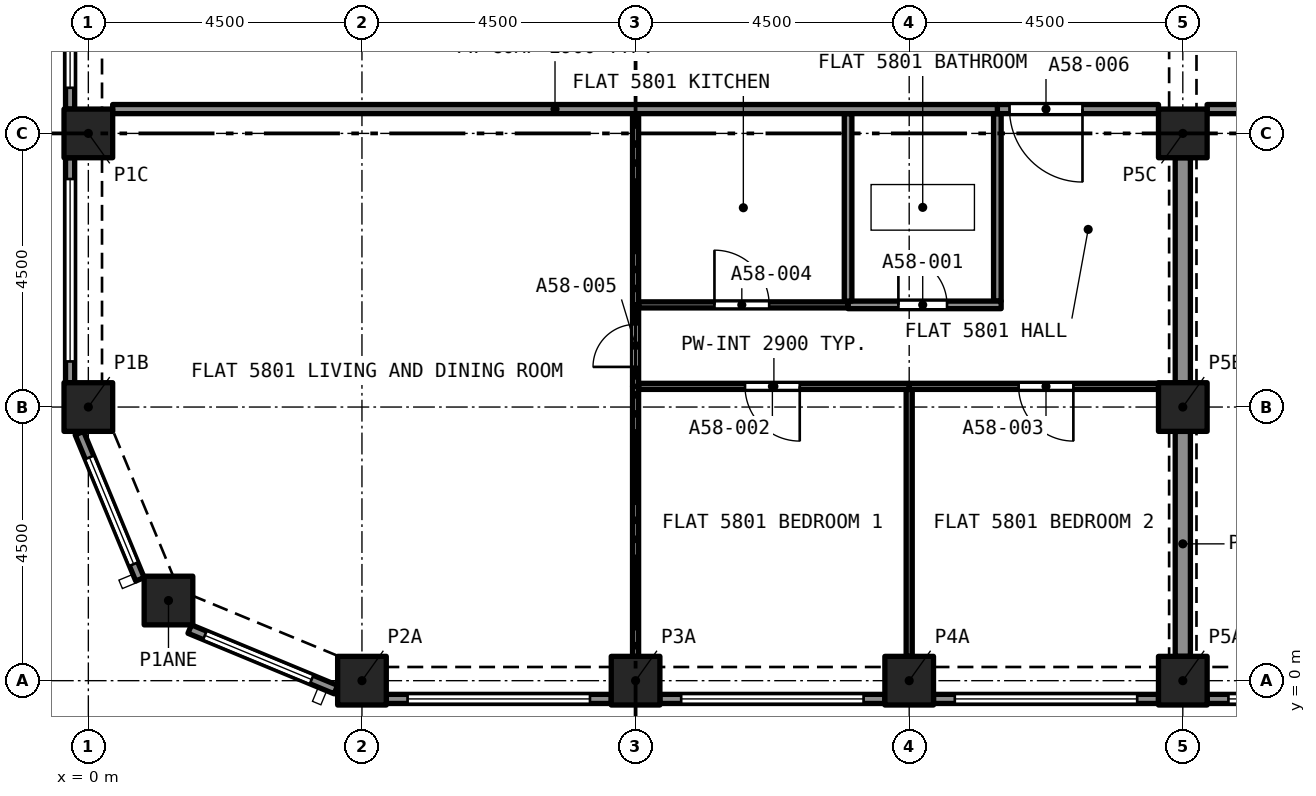
"""IFC4 building model, lengths in metres.
Left out: names, types, materials, properties, quantities, classifications, styles, units other than length and angle.
Written with IfcOpenShell. Run it as: python <this file> out.ifc"""

import sys

from ifc_helpers import new_model, si_unit, direction, frame, frame_2d, origin, origin_2d, place, context, subcontext, project, spatial, rectangle, extrude, element, fill, save


model = new_model("IFC4")
c1 = context("Model", 3, precision=1e-05, world=origin(), true_north=direction((0.0, 1.0)))
c2 = subcontext(c1, "Body", "Model", "MODEL_VIEW")
j1 = project(units=[si_unit("LENGTHUNIT", "METRE"), si_unit("PLANEANGLEUNIT", "RADIAN")], contexts=[c1])
p1 = place(None, origin())
s1 = spatial("IfcSite", under=j1, at=p1, CompositionType="ELEMENT")
p2 = place(p1, origin())
s2 = spatial("IfcBuilding", under=s1, at=p2, CompositionType="ELEMENT")
p3 = place(p2, frame((0.0, 0.0, 210.095)))
s3 = spatial("IfcBuildingStorey", under=s2, at=p3, CompositionType="ELEMENT", Elevation=210.095)
for number, where, z_axis, x_axis in (
    (1, (4.5, 0.0, 0.0), (0.0, 0.0, 1.0), (1.0, 0.0, 0.0)),
    (2, (9.0, 0.0, 0.0), (0.0, 0.0, 1.0), (1.0, 0.0, 0.0)),
    (3, (13.5, 0.0, 0.0), (0.0, 0.0, 1.0), (1.0, 0.0, 0.0)),
    (4, (18.0, 0.0, 0.0), (0.0, 0.0, 1.0), (1.0, 0.0, 0.0)),
    (5, (1.318, 1.318, 0.0), (0.0, 0.0, 1.0), (1.0, 0.0, 0.0)),
    (6, (0.0, 4.5, 0.0), (0.0, 0.0, 1.0), (1.0, 0.0, 0.0)),
    (7, (18.0, 4.5, 0.0), (0.0, 0.0, 1.0), (1.0, 0.0, 0.0)),
    (8, (0.0, 9.0, 0.0), (0.0, 0.0, 1.0), (1.0, 0.0, 0.0)),
    (9, (18.0, 9.0, 0.0), (0.0, 0.0, 1.0), (1.0, 0.0, 0.0)),
):
    element("IfcColumn", number, at=place(p3, frame(where, z_axis=z_axis, x_axis=x_axis)), inside=s3, PredefinedType="COLUMN", context=c2, shape_type="SweptSolid", body=[
        extrude(rectangle(XDim=0.8, YDim=0.8, at=origin_2d()), origin(), (0.0, 0.0, 1.0), 3.2),
    ])
p4 = place(p3, frame((-0.3, 9.4, 0.0), z_axis=(0.0, 0.0, 1.0), x_axis=(0.0, 1.0, 0.0)))
e10 = element("IfcWall", 10, at=p4, inside=s3, PredefinedType="SOLIDWALL", context=c2, shape_type="SweptSolid", body=[
    extrude(rectangle(XDim=3.7, YDim=0.15, at=frame_2d((1.85, 0.0))), origin(), (0.0, 0.0, 1.0), 3.2),
])
p5 = place(p4, frame((0.35, 0.0, 0.45)))
e11 = element("IfcOpeningElement", 11, at=p5, cuts=e10, PredefinedType="OPENING", context=c2, shape_type="SweptSolid", body=[
    extrude(rectangle(XDim=3.0, YDim=1.95, at=frame_2d((1.5, 0.975))), frame((0.0, 0.085, 0.0), z_axis=(0.0, -1.0, 0.0), x_axis=(1.0, 0.0, 0.0)), (0.0, 0.0, 1.0), 0.17),
])
p6 = place(p3, frame((-0.3, 4.9, 0.0), z_axis=(0.0, 0.0, 1.0), x_axis=(0.0, 1.0, 0.0)))
e12 = element("IfcWall", 12, at=p6, inside=s3, PredefinedType="SOLIDWALL", context=c2, shape_type="SweptSolid", body=[
    extrude(rectangle(XDim=3.7, YDim=0.15, at=frame_2d((1.85, 0.0))), origin(), (0.0, 0.0, 1.0), 3.2),
])
p7 = place(p6, frame((0.35, 0.0, 0.45)))
e13 = element("IfcOpeningElement", 13, at=p7, cuts=e12, PredefinedType="OPENING", context=c2, shape_type="SweptSolid", body=[
    extrude(rectangle(XDim=3.0, YDim=1.95, at=frame_2d((1.5, 0.975))), frame((0.0, 0.085, 0.0), z_axis=(0.0, -1.0, 0.0), x_axis=(1.0, 0.0, 0.0)), (0.0, 0.0, 1.0), 0.17),
])
p8 = place(p3, frame((0.849, 1.667, 0.0), z_axis=(0.0, 0.0, 1.0), x_axis=(-0.382669406082, 0.923885342263, 0.0)))
e14 = element("IfcWall", 14, at=p8, inside=s3, PredefinedType="SOLIDWALL", context=c2, shape_type="SweptSolid", body=[
    extrude(rectangle(XDim=2.602, YDim=0.15, at=frame_2d((1.301, 0.0))), origin(), (0.0, 0.0, 1.0), 3.2),
])
p9 = place(p8, frame((0.27, 0.0, 0.45)))
e15 = element("IfcOpeningElement", 15, at=p9, cuts=e14, PredefinedType="OPENING", context=c2, shape_type="SweptSolid", body=[
    extrude(rectangle(XDim=1.9, YDim=1.95, at=frame_2d((0.95, 0.975))), frame((0.0, 0.085, 0.0), z_axis=(0.0, -1.0, 0.0), x_axis=(1.0, 0.0, 0.0)), (0.0, 0.0, 1.0), 0.17),
])
p10 = place(p3, frame((4.071, -0.147, 0.0), z_axis=(0.0, 0.0, 1.0), x_axis=(-0.923885342263, 0.382669406082, 0.0)))
e16 = element("IfcWall", 16, at=p10, inside=s3, PredefinedType="SOLIDWALL", context=c2, shape_type="SweptSolid", body=[
    extrude(rectangle(XDim=2.602, YDim=0.15, at=frame_2d((1.301, 0.0))), origin(), (0.0, 0.0, 1.0), 3.2),
])
p11 = place(p10, frame((0.432, 0.0, 0.45)))
e17 = element("IfcOpeningElement", 17, at=p11, cuts=e16, PredefinedType="OPENING", context=c2, shape_type="SweptSolid", body=[
    extrude(rectangle(XDim=1.9, YDim=1.95, at=frame_2d((0.95, 0.975))), frame((0.0, 0.085, 0.0), z_axis=(0.0, -1.0, 0.0), x_axis=(1.0, 0.0, 0.0)), (0.0, 0.0, 1.0), 0.17),
])
p12 = place(p3, frame((8.6, -0.3, 0.0), z_axis=(0.0, 0.0, 1.0), x_axis=(-1.0, 0.0, 0.0)))
e18 = element("IfcWall", 18, at=p12, inside=s3, PredefinedType="SOLIDWALL", context=c2, shape_type="SweptSolid", body=[
    extrude(rectangle(XDim=3.7, YDim=0.15, at=frame_2d((1.85, 0.0))), origin(), (0.0, 0.0, 1.0), 3.2),
])
p13 = place(p12, frame((0.35, 0.0, 0.45)))
e19 = element("IfcOpeningElement", 19, at=p13, cuts=e18, PredefinedType="OPENING", context=c2, shape_type="SweptSolid", body=[
    extrude(rectangle(XDim=3.0, YDim=1.95, at=frame_2d((1.5, 0.975))), frame((0.0, 0.085, 0.0), z_axis=(0.0, -1.0, 0.0), x_axis=(1.0, 0.0, 0.0)), (0.0, 0.0, 1.0), 0.17),
])
p14 = place(p3, frame((13.1, -0.3, 0.0), z_axis=(0.0, 0.0, 1.0), x_axis=(-1.0, 0.0, 0.0)))
e20 = element("IfcWall", 20, at=p14, inside=s3, PredefinedType="SOLIDWALL", context=c2, shape_type="SweptSolid", body=[
    extrude(rectangle(XDim=3.7, YDim=0.15, at=frame_2d((1.85, 0.0))), origin(), (0.0, 0.0, 1.0), 3.2),
])
p15 = place(p14, frame((0.35, 0.0, 0.45)))
e21 = element("IfcOpeningElement", 21, at=p15, cuts=e20, PredefinedType="OPENING", context=c2, shape_type="SweptSolid", body=[
    extrude(rectangle(XDim=3.0, YDim=1.95, at=frame_2d((1.5, 0.975))), frame((0.0, 0.085, 0.0), z_axis=(0.0, -1.0, 0.0), x_axis=(1.0, 0.0, 0.0)), (0.0, 0.0, 1.0), 0.17),
])
p16 = place(p3, frame((17.6, -0.3, 0.0), z_axis=(0.0, 0.0, 1.0), x_axis=(-1.0, 0.0, 0.0)))
e22 = element("IfcWall", 22, at=p16, inside=s3, PredefinedType="SOLIDWALL", context=c2, shape_type="SweptSolid", body=[
    extrude(rectangle(XDim=3.7, YDim=0.15, at=frame_2d((1.85, 0.0))), origin(), (0.0, 0.0, 1.0), 3.2),
])
p17 = place(p16, frame((0.35, 0.0, 0.45)))
e23 = element("IfcOpeningElement", 23, at=p17, cuts=e22, PredefinedType="OPENING", context=c2, shape_type="SweptSolid", body=[
    extrude(rectangle(XDim=3.0, YDim=1.95, at=frame_2d((1.5, 0.975))), frame((0.0, 0.085, 0.0), z_axis=(0.0, -1.0, 0.0), x_axis=(1.0, 0.0, 0.0)), (0.0, 0.0, 1.0), 0.17),
])
p18 = place(p3, frame((22.1, -0.3, 0.0), z_axis=(0.0, 0.0, 1.0), x_axis=(-1.0, 0.0, 0.0)))
e24 = element("IfcWall", 24, at=p18, inside=s3, PredefinedType="SOLIDWALL", context=c2, shape_type="SweptSolid", body=[
    extrude(rectangle(XDim=3.7, YDim=0.15, at=frame_2d((1.85, 0.0))), origin(), (0.0, 0.0, 1.0), 3.2),
])
p19 = place(p18, frame((0.35, 0.0, 0.45)))
e25 = element("IfcOpeningElement", 25, at=p19, cuts=e24, PredefinedType="OPENING", context=c2, shape_type="SweptSolid", body=[
    extrude(rectangle(XDim=3.0, YDim=1.95, at=frame_2d((1.5, 0.975))), frame((0.0, 0.085, 0.0), z_axis=(0.0, -1.0, 0.0), x_axis=(1.0, 0.0, 0.0)), (0.0, 0.0, 1.0), 0.17),
])
p20 = place(p3, frame((14.95, 6.242, 0.0), z_axis=(0.0, 0.0, 1.0), x_axis=(0.0, 1.0, 0.0)))
e26 = element("IfcWall", 26, at=p20, inside=s3, PredefinedType="PARTITIONING", context=c2, shape_type="SweptSolid", body=[
    extrude(rectangle(XDim=3.083, YDim=0.125, at=frame_2d((1.541, 0.0))), origin(), (0.0, 0.0, 1.0), 2.9),
])
p21 = place(p3, frame((12.495, 6.18, 0.0), z_axis=(0.0, 0.0, 1.0), x_axis=(1.0, 0.0, 0.0)))
e27 = element("IfcWall", 27, at=p21, inside=s3, PredefinedType="PARTITIONING", context=c2, shape_type="SweptSolid", body=[
    extrude(rectangle(XDim=2.518, YDim=0.125, at=frame_2d((1.259, 0.0))), origin(), (0.0, 0.0, 1.0), 2.9),
])
p22 = place(p21, frame((0.828, 0.0, 0.0)))
e28 = element("IfcOpeningElement", 28, at=p22, cuts=e27, PredefinedType="OPENING", context=c2, shape_type="SweptSolid", body=[
    extrude(rectangle(XDim=0.8, YDim=2.1, at=frame_2d((0.4, 1.05))), frame((0.0, 0.073, 0.0), z_axis=(0.0, -1.0, 0.0), x_axis=(1.0, 0.0, 0.0)), (0.0, 0.0, 1.0), 0.145),
])
p23 = place(p3, frame((12.495, 6.242, 0.0), z_axis=(0.0, 0.0, 1.0), x_axis=(0.0, 1.0, 0.0)))
e29 = element("IfcWall", 29, at=p23, inside=s3, PredefinedType="PARTITIONING", context=c2, shape_type="SweptSolid", body=[
    extrude(rectangle(XDim=3.083, YDim=0.125, at=frame_2d((1.541, 0.0))), origin(), (0.0, 0.0, 1.0), 2.9),
])
p24 = place(p3, frame((13.5, 0.4, 0.0), z_axis=(0.0, 0.0, 1.0), x_axis=(0.0, 1.0, 0.0)))
e30 = element("IfcWall", 30, at=p24, inside=s3, PredefinedType="PARTITIONING", context=c2, shape_type="SweptSolid", body=[
    extrude(rectangle(XDim=4.39, YDim=0.1, at=frame_2d((2.195, 0.0))), origin(), (0.0, 0.0, 1.0), 2.9),
])
p25 = place(p3, frame((13.5, 4.84, 0.0), z_axis=(0.0, 0.0, 1.0), x_axis=(-1.0, 0.0, 0.0)))
e31 = element("IfcWall", 31, at=p25, inside=s3, PredefinedType="PARTITIONING", context=c2, shape_type="SweptSolid", body=[
    extrude(rectangle(XDim=4.45, YDim=0.1, at=frame_2d((2.225, 0.0))), origin(), (0.0, 0.0, 1.0), 2.9),
])
p26 = place(p25, frame((1.8, 0.0, 0.0)))
e32 = element("IfcOpeningElement", 32, at=p26, cuts=e31, PredefinedType="OPENING", context=c2, shape_type="SweptSolid", body=[
    extrude(rectangle(XDim=0.9, YDim=2.1, at=frame_2d((0.45, 1.05))), frame((0.0, 0.06, 0.0), z_axis=(0.0, -1.0, 0.0), x_axis=(1.0, 0.0, 0.0)), (0.0, 0.0, 1.0), 0.12),
])
p27 = place(p3, frame((9.0, 0.4, 0.0), z_axis=(0.0, 0.0, 1.0), x_axis=(0.0, 1.0, 0.0)))
e33 = element("IfcWall", 33, at=p27, inside=s3, PredefinedType="PARTITIONING", context=c2, shape_type="SweptSolid", body=[
    extrude(rectangle(XDim=4.44, YDim=0.1, at=frame_2d((2.22, 0.0))), origin(), (0.0, 0.0, 1.0), 2.9),
])
p28 = place(p3, frame((17.6, 4.84, 0.0), z_axis=(0.0, 0.0, 1.0), x_axis=(-1.0, 0.0, 0.0)))
e34 = element("IfcWall", 34, at=p28, inside=s3, PredefinedType="PARTITIONING", context=c2, shape_type="SweptSolid", body=[
    extrude(rectangle(XDim=4.1, YDim=0.1, at=frame_2d((2.05, 0.0))), origin(), (0.0, 0.0, 1.0), 2.9),
])
p29 = place(p28, frame((1.4, 0.0, 0.0)))
e35 = element("IfcOpeningElement", 35, at=p29, cuts=e34, PredefinedType="OPENING", context=c2, shape_type="SweptSolid", body=[
    extrude(rectangle(XDim=0.9, YDim=2.1, at=frame_2d((0.45, 1.05))), frame((0.0, 0.06, 0.0), z_axis=(0.0, -1.0, 0.0), x_axis=(1.0, 0.0, 0.0)), (0.0, 0.0, 1.0), 0.12),
])
p30 = place(p3, frame((18.0, 0.4, 0.0), z_axis=(0.0, 0.0, 1.0), x_axis=(0.0, 1.0, 0.0)))
e36 = element("IfcWall", 36, at=p30, inside=s3, PredefinedType="PARTITIONING", context=c2, shape_type="SweptSolid", body=[
    extrude(rectangle(XDim=3.7, YDim=0.25, at=frame_2d((1.85, 0.0))), origin(), (0.0, 0.0, 1.0), 2.38),
])
p31 = place(p3, frame((9.05, 6.18, 0.0), z_axis=(0.0, 0.0, 1.0), x_axis=(1.0, 0.0, 0.0)))
e37 = element("IfcWall", 37, at=p31, inside=s3, PredefinedType="PARTITIONING", context=c2, shape_type="SweptSolid", body=[
    extrude(rectangle(XDim=3.445, YDim=0.1, at=frame_2d((1.722, 0.0))), origin(), (0.0, 0.0, 1.0), 2.9),
])
p32 = place(p31, frame((1.247, 0.0, 0.0)))
e38 = element("IfcOpeningElement", 38, at=p32, cuts=e37, PredefinedType="OPENING", context=c2, shape_type="SweptSolid", body=[
    extrude(rectangle(XDim=0.9, YDim=2.1, at=frame_2d((0.45, 1.05))), frame((0.0, 0.06, 0.0), z_axis=(0.0, -1.0, 0.0), x_axis=(1.0, 0.0, 0.0)), (0.0, 0.0, 1.0), 0.12),
])
p33 = place(p3, frame((9.0, 4.84, 0.0), z_axis=(0.0, 0.0, 1.0), x_axis=(0.0, 1.0, 0.0)))
e39 = element("IfcWall", 39, at=p33, inside=s3, PredefinedType="PARTITIONING", context=c2, shape_type="SweptSolid", body=[
    extrude(rectangle(XDim=1.34, YDim=0.1, at=frame_2d((0.67, 0.0))), origin(), (0.0, 0.0, 1.0), 2.9),
])
p34 = place(p33, frame((0.32, 0.0, 0.0)))
e40 = element("IfcOpeningElement", 40, at=p34, cuts=e39, PredefinedType="OPENING", context=c2, shape_type="SweptSolid", body=[
    extrude(rectangle(XDim=0.7, YDim=2.1, at=frame_2d((0.35, 1.05))), frame((0.0, 0.06, 0.0), z_axis=(0.0, -1.0, 0.0), x_axis=(1.0, 0.0, 0.0)), (0.0, 0.0, 1.0), 0.12),
])
p35 = place(p3, frame((18.0, 4.9, 0.0), z_axis=(0.0, 0.0, 1.0), x_axis=(0.0, 1.0, 0.0)))
e41 = element("IfcWall", 41, at=p35, inside=s3, PredefinedType="PARTITIONING", context=c2, shape_type="SweptSolid", body=[
    extrude(rectangle(XDim=3.7, YDim=0.25, at=frame_2d((1.85, 0.0))), origin(), (0.0, 0.0, 1.0), 2.38),
])
p36 = place(p3, frame((17.6, 9.4, 0.0), z_axis=(0.0, 0.0, 1.0), x_axis=(-1.0, 0.0, 0.0)))
e42 = element("IfcWall", 42, at=p36, inside=s3, PredefinedType="PARTITIONING", context=c2, shape_type="SweptSolid", body=[
    extrude(rectangle(XDim=2.65, YDim=0.15, at=frame_2d((1.325, 0.0))), origin(), (0.0, 0.0, 1.0), 2.9),
])
p37 = place(p36, frame((1.25, 0.0, 0.0)))
e43 = element("IfcOpeningElement", 43, at=p37, cuts=e42, PredefinedType="OPENING", context=c2, shape_type="SweptSolid", body=[
    extrude(rectangle(XDim=1.2, YDim=2.4, at=frame_2d((0.6, 1.2))), frame((0.0, 0.085, 0.0), z_axis=(0.0, -1.0, 0.0), x_axis=(1.0, 0.0, 0.0)), (0.0, 0.0, 1.0), 0.17),
])
p38 = place(p3, frame((9.0, 6.18, 0.0), z_axis=(0.0, 0.0, 1.0), x_axis=(0.0, 1.0, 0.0)))
e44 = element("IfcWall", 44, at=p38, inside=s3, PredefinedType="PARTITIONING", context=c2, shape_type="SweptSolid", body=[
    extrude(rectangle(XDim=3.145, YDim=0.1, at=frame_2d((1.573, 0.0))), origin(), (0.0, 0.0, 1.0), 2.9),
])
p39 = place(p3, frame((0.4, 9.4, 0.0), z_axis=(0.0, 0.0, 1.0), x_axis=(1.0, 0.0, 0.0)))
e45 = element("IfcWall", 45, at=p39, inside=s3, PredefinedType="PARTITIONING", context=c2, shape_type="SweptSolid", body=[
    extrude(rectangle(XDim=14.55, YDim=0.15, at=frame_2d((7.275, 0.0))), origin(), (0.0, 0.0, 1.0), 2.9),
])
p40 = place(p3, frame((27.0, 9.4, 0.0), z_axis=(0.0, 0.0, 1.0), x_axis=(-1.0, 0.0, 0.0)))
e46 = element("IfcWall", 46, at=p40, inside=s3, PredefinedType="PARTITIONING", context=c2, shape_type="SweptSolid", body=[
    extrude(rectangle(XDim=8.6, YDim=0.15, at=frame_2d((4.3, 0.0))), origin(), (0.0, 0.0, 1.0), 2.75),
])
p41 = place(p40, frame((4.0, 0.0, 0.0)))
e47 = element("IfcOpeningElement", 47, at=p41, cuts=e46, PredefinedType="OPENING", context=c2, shape_type="SweptSolid", body=[
    extrude(rectangle(XDim=1.0, YDim=2.1, at=frame_2d((0.5, 1.05))), frame((0.0, 0.085, 0.0), z_axis=(0.0, -1.0, 0.0), x_axis=(1.0, 0.0, 0.0)), (0.0, 0.0, 1.0), 0.17),
])
p42 = place(p5, origin())
e48 = element("IfcWindow", 48, at=p42, inside=s3, PartitioningType="SINGLE_PANEL", PredefinedType="WINDOW", context=c2, shape_type="SweptSolid", body=[
    extrude(rectangle(XDim=3.0, YDim=1.95, at=frame_2d((1.5, 0.975))), frame((0.0, 0.03, 0.0), z_axis=(0.0, -1.0, 0.0), x_axis=(1.0, 0.0, 0.0)), (0.0, 0.0, 1.0), 0.06),
])
fill(e11, e48)
p43 = place(p7, origin())
e49 = element("IfcWindow", 49, at=p43, inside=s3, PartitioningType="SINGLE_PANEL", PredefinedType="WINDOW", context=c2, shape_type="SweptSolid", body=[
    extrude(rectangle(XDim=3.0, YDim=1.95, at=frame_2d((1.5, 0.975))), frame((0.0, 0.03, 0.0), z_axis=(0.0, -1.0, 0.0), x_axis=(1.0, 0.0, 0.0)), (0.0, 0.0, 1.0), 0.06),
])
fill(e13, e49)
p44 = place(p9, origin())
e50 = element("IfcWindow", 50, at=p44, inside=s3, PartitioningType="SINGLE_PANEL", PredefinedType="WINDOW", context=c2, shape_type="SweptSolid", body=[
    extrude(rectangle(XDim=1.9, YDim=1.95, at=frame_2d((0.95, 0.975))), frame((0.0, 0.03, 0.0), z_axis=(0.0, -1.0, 0.0), x_axis=(1.0, 0.0, 0.0)), (0.0, 0.0, 1.0), 0.06),
])
fill(e15, e50)
p45 = place(p11, origin())
e51 = element("IfcWindow", 51, at=p45, inside=s3, PartitioningType="SINGLE_PANEL", PredefinedType="WINDOW", context=c2, shape_type="SweptSolid", body=[
    extrude(rectangle(XDim=1.9, YDim=1.95, at=frame_2d((0.95, 0.975))), frame((0.0, 0.03, 0.0), z_axis=(0.0, -1.0, 0.0), x_axis=(1.0, 0.0, 0.0)), (0.0, 0.0, 1.0), 0.06),
])
fill(e17, e51)
p46 = place(p13, origin())
e52 = element("IfcWindow", 52, at=p46, inside=s3, PartitioningType="SINGLE_PANEL", PredefinedType="WINDOW", context=c2, shape_type="SweptSolid", body=[
    extrude(rectangle(XDim=3.0, YDim=1.95, at=frame_2d((1.5, 0.975))), frame((0.0, 0.03, 0.0), z_axis=(0.0, -1.0, 0.0), x_axis=(1.0, 0.0, 0.0)), (0.0, 0.0, 1.0), 0.06),
])
fill(e19, e52)
p47 = place(p15, origin())
e53 = element("IfcWindow", 53, at=p47, inside=s3, PartitioningType="SINGLE_PANEL", PredefinedType="WINDOW", context=c2, shape_type="SweptSolid", body=[
    extrude(rectangle(XDim=3.0, YDim=1.95, at=frame_2d((1.5, 0.975))), frame((0.0, 0.03, 0.0), z_axis=(0.0, -1.0, 0.0), x_axis=(1.0, 0.0, 0.0)), (0.0, 0.0, 1.0), 0.06),
])
fill(e21, e53)
p48 = place(p17, origin())
e54 = element("IfcWindow", 54, at=p48, inside=s3, PartitioningType="SINGLE_PANEL", PredefinedType="WINDOW", context=c2, shape_type="SweptSolid", body=[
    extrude(rectangle(XDim=3.0, YDim=1.95, at=frame_2d((1.5, 0.975))), frame((0.0, 0.03, 0.0), z_axis=(0.0, -1.0, 0.0), x_axis=(1.0, 0.0, 0.0)), (0.0, 0.0, 1.0), 0.06),
])
fill(e23, e54)
p49 = place(p19, origin())
e55 = element("IfcWindow", 55, at=p49, inside=s3, PartitioningType="SINGLE_PANEL", PredefinedType="WINDOW", context=c2, shape_type="SweptSolid", body=[
    extrude(rectangle(XDim=3.0, YDim=1.95, at=frame_2d((1.5, 0.975))), frame((0.0, 0.03, 0.0), z_axis=(0.0, -1.0, 0.0), x_axis=(1.0, 0.0, 0.0)), (0.0, 0.0, 1.0), 0.06),
])
fill(e25, e55)
p50 = place(p22, origin())
e56 = element("IfcDoor", 56, at=p50, inside=s3, OperationType="SINGLE_SWING_LEFT", PredefinedType="DOOR", context=c2, shape_type="SweptSolid", body=[
    extrude(rectangle(XDim=0.8, YDim=2.1, at=frame_2d((0.4, 1.05))), frame((0.0, 0.025, 0.0), z_axis=(0.0, -1.0, 0.0), x_axis=(1.0, 0.0, 0.0)), (0.0, 0.0, 1.0), 0.05),
])
fill(e28, e56)
p51 = place(p26, origin())
e57 = element("IfcDoor", 57, at=p51, inside=s3, OperationType="SINGLE_SWING_RIGHT", PredefinedType="DOOR", context=c2, shape_type="SweptSolid", body=[
    extrude(rectangle(XDim=0.9, YDim=2.1, at=frame_2d((0.45, 1.05))), frame((0.0, 0.025, 0.0), z_axis=(0.0, -1.0, 0.0), x_axis=(1.0, 0.0, 0.0)), (0.0, 0.0, 1.0), 0.05),
])
fill(e32, e57)
p52 = place(p29, origin())
e58 = element("IfcDoor", 58, at=p52, inside=s3, OperationType="SINGLE_SWING_LEFT", PredefinedType="DOOR", context=c2, shape_type="SweptSolid", body=[
    extrude(rectangle(XDim=0.9, YDim=2.1, at=frame_2d((0.45, 1.05))), frame((0.0, 0.025, 0.0), z_axis=(0.0, -1.0, 0.0), x_axis=(1.0, 0.0, 0.0)), (0.0, 0.0, 1.0), 0.05),
])
fill(e35, e58)
p53 = place(p32, origin())
e59 = element("IfcDoor", 59, at=p53, inside=s3, OperationType="SINGLE_SWING_LEFT", PredefinedType="DOOR", context=c2, shape_type="SweptSolid", body=[
    extrude(rectangle(XDim=0.9, YDim=2.1, at=frame_2d((0.45, 1.05))), frame((0.0, 0.025, 0.0), z_axis=(0.0, -1.0, 0.0), x_axis=(1.0, 0.0, 0.0)), (0.0, 0.0, 1.0), 0.05),
])
fill(e38, e59)
p54 = place(p34, origin())
e60 = element("IfcDoor", 60, at=p54, inside=s3, OperationType="SINGLE_SWING_RIGHT", PredefinedType="DOOR", context=c2, shape_type="SweptSolid", body=[
    extrude(rectangle(XDim=0.7, YDim=2.1, at=frame_2d((0.35, 1.05))), frame((0.0, 0.025, 0.0), z_axis=(0.0, -1.0, 0.0), x_axis=(1.0, 0.0, 0.0)), (0.0, 0.0, 1.0), 0.05),
])
fill(e40, e60)
p55 = place(p37, origin())
e61 = element("IfcDoor", 61, at=p55, inside=s3, OperationType="SINGLE_SWING_RIGHT", PredefinedType="DOOR", context=c2, shape_type="SweptSolid", body=[
    extrude(rectangle(XDim=1.2, YDim=2.4, at=frame_2d((0.6, 1.2))), frame((0.0, 0.025, 0.0), z_axis=(0.0, -1.0, 0.0), x_axis=(1.0, 0.0, 0.0)), (0.0, 0.0, 1.0), 0.05),
])
fill(e43, e61)
save(model, sys.argv[1])
